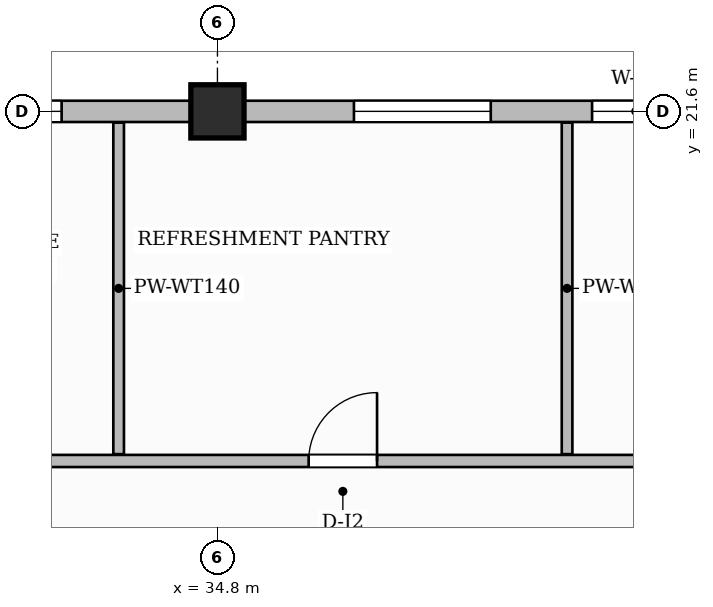
"""IFC4 building model, lengths in metres.
Left out: names, types, materials, properties, quantities, classifications, styles, units other than length and angle.
Written with IfcOpenShell. Run it as: python <this file> out.ifc"""

import sys

from ifc_helpers import new_model, si_unit, direction, frame, frame_2d, origin, origin_2d, place, context, subcontext, project, spatial, rectangle, extrude, source, transform, mapped, element, fill, save


model = new_model("IFC4")
c1 = context("Model", 3, precision=1e-05, world=origin(), true_north=direction((0.0, 1.0)))
c2 = subcontext(c1, "Body", "Model", "MODEL_VIEW")
j1 = project(units=[si_unit("LENGTHUNIT", "METRE"), si_unit("PLANEANGLEUNIT", "RADIAN")], contexts=[c1])
p1 = place(None, origin())
s1 = spatial("IfcSite", under=j1, at=p1, CompositionType="ELEMENT")
p2 = place(p1, origin())
s2 = spatial("IfcBuilding", under=s1, at=p2, CompositionType="ELEMENT")
p3 = place(p2, frame((0.0, 0.0, 290.45)))
s3 = spatial("IfcBuildingStorey", under=s2, at=p3, CompositionType="ELEMENT", Elevation=290.45)
m1 = source(origin(), c2, "Body", "SweptSolid", [
    extrude(rectangle(XDim=0.7, YDim=0.7, at=origin_2d()), origin(), (0.0, 0.0, 1.0), 3.85),
])
p4 = place(p3, frame((34.8, 21.6, 0.0), z_axis=(0.0, 0.0, 1.0), x_axis=(1.0, 0.0, 0.0)))
e1 = element("IfcColumn", 1, at=p4, inside=s3, PredefinedType="COLUMN", context=c2, shape_type="MappedRepresentation", body=[
    mapped(m1, transform((0.0, 0.0, 0.0), scale=1.0)),
])
p5 = place(p3, frame((30.29, 17.0, 0.0), z_axis=(0.0, 0.0, 1.0), x_axis=(1.0, 0.0, 0.0)))
e2 = element("IfcWall", 2, at=p5, inside=s3, PredefinedType="PARTITIONING", context=c2, shape_type="SweptSolid", body=[
    extrude(rectangle(XDim=19.37, YDim=0.16, at=frame_2d((9.685, 0.0))), origin(), (0.0, 0.0, 1.0), 3.55),
])
p6 = place(p5, frame((1.135, 0.0, 0.0)))
e3 = element("IfcOpeningElement", 3, at=p6, cuts=e2, PredefinedType="OPENING", context=c2, shape_type="SweptSolid", body=[
    extrude(rectangle(XDim=0.85, YDim=2.1, at=frame_2d((0.425, 1.05))), frame((0.0, 0.09, 0.0), z_axis=(0.0, -1.0, 0.0), x_axis=(1.0, 0.0, 0.0)), (0.0, 0.0, 1.0), 0.18),
])
p7 = place(p5, frame((5.71, 0.0, 0.0)))
e4 = element("IfcOpeningElement", 4, at=p7, cuts=e2, PredefinedType="OPENING", context=c2, shape_type="SweptSolid", body=[
    extrude(rectangle(XDim=0.9, YDim=2.15, at=frame_2d((0.45, 1.075))), frame((0.0, 0.09, 0.0), z_axis=(0.0, -1.0, 0.0), x_axis=(1.0, 0.0, 0.0)), (0.0, 0.0, 1.0), 0.18),
])
p8 = place(p5, frame((10.635, 0.0, 0.0)))
e5 = element("IfcOpeningElement", 5, at=p8, cuts=e2, PredefinedType="OPENING", context=c2, shape_type="SweptSolid", body=[
    extrude(rectangle(XDim=0.95, YDim=2.15, at=frame_2d((0.475, 1.075))), frame((0.0, 0.09, 0.0), z_axis=(0.0, -1.0, 0.0), x_axis=(1.0, 0.0, 0.0)), (0.0, 0.0, 1.0), 0.18),
])
p9 = place(p5, frame((16.235, 0.0, 0.0)))
e6 = element("IfcOpeningElement", 6, at=p9, cuts=e2, PredefinedType="OPENING", context=c2, shape_type="SweptSolid", body=[
    extrude(rectangle(XDim=0.95, YDim=2.15, at=frame_2d((0.475, 1.075))), frame((0.0, 0.09, 0.0), z_axis=(0.0, -1.0, 0.0), x_axis=(1.0, 0.0, 0.0)), (0.0, 0.0, 1.0), 0.18),
])
for number, where, z_axis, x_axis in (
    (7, (33.5, 17.09, 0.0), (0.0, 0.0, 1.0), (0.0, 1.0, 0.0)),
    (8, (39.4, 17.09, 0.0), (0.0, 0.0, 1.0), (0.0, 1.0, 0.0)),
):
    element("IfcWall", number, at=place(p3, frame(where, z_axis=z_axis, x_axis=x_axis)), inside=s3, PredefinedType="PARTITIONING", context=c2, shape_type="SweptSolid", body=[
        extrude(rectangle(XDim=4.362, YDim=0.14, at=frame_2d((2.181, 0.0))), origin(), (0.0, 0.0, 1.0), 3.55),
    ])
p10 = place(p3, frame((18.0, 21.6, 0.0), z_axis=(0.0, 0.0, 1.0), x_axis=(1.0, 0.0, 0.0)))
e9 = element("IfcWall", 9, at=p10, inside=s3, PredefinedType="SOLIDWALL", context=c2, shape_type="SweptSolid", body=[
    extrude(rectangle(XDim=31.8, YDim=0.28, at=frame_2d((15.9, 0.0))), origin(), (0.0, 0.0, 1.0), 3.135),
])
p11 = place(p10, frame((0.42, 0.0, 0.0)))
e10 = element("IfcOpeningElement", 10, at=p11, cuts=e9, PredefinedType="OPENING", context=c2, shape_type="SweptSolid", body=[
    extrude(rectangle(XDim=1.2, YDim=2.2, at=frame_2d((0.6, 1.1))), frame((0.0, 0.15, 0.0), z_axis=(0.0, -1.0, 0.0), x_axis=(1.0, 0.0, 0.0)), (0.0, 0.0, 1.0), 0.3),
])
p12 = place(p10, frame((4.581, 0.0, 0.8)))
e11 = element("IfcOpeningElement", 11, at=p12, cuts=e9, PredefinedType="OPENING", context=c2, shape_type="SweptSolid", body=[
    extrude(rectangle(XDim=0.95, YDim=1.75, at=frame_2d((0.475, 0.875))), frame((0.0, 0.15, 0.0), z_axis=(0.0, -1.0, 0.0), x_axis=(1.0, 0.0, 0.0)), (0.0, 0.0, 1.0), 0.3),
])
p13 = place(p10, frame((6.964, 0.0, 0.8)))
e12 = element("IfcOpeningElement", 12, at=p13, cuts=e9, PredefinedType="OPENING", context=c2, shape_type="SweptSolid", body=[
    extrude(rectangle(XDim=1.8, YDim=1.85, at=frame_2d((0.9, 0.925))), frame((0.0, 0.15, 0.0), z_axis=(0.0, -1.0, 0.0), x_axis=(1.0, 0.0, 0.0)), (0.0, 0.0, 1.0), 0.3),
])
p14 = place(p10, frame((12.95, 0.0, 0.8)))
e13 = element("IfcOpeningElement", 13, at=p14, cuts=e9, PredefinedType="OPENING", context=c2, shape_type="SweptSolid", body=[
    extrude(rectangle(XDim=1.8, YDim=1.85, at=frame_2d((0.9, 0.925))), frame((0.0, 0.15, 0.0), z_axis=(0.0, -1.0, 0.0), x_axis=(1.0, 0.0, 0.0)), (0.0, 0.0, 1.0), 0.3),
])
p15 = place(p10, frame((18.596, 0.0, 0.8)))
e14 = element("IfcOpeningElement", 14, at=p15, cuts=e9, PredefinedType="OPENING", context=c2, shape_type="SweptSolid", body=[
    extrude(rectangle(XDim=1.8, YDim=1.85, at=frame_2d((0.9, 0.925))), frame((0.0, 0.15, 0.0), z_axis=(0.0, -1.0, 0.0), x_axis=(1.0, 0.0, 0.0)), (0.0, 0.0, 1.0), 0.3),
])
p16 = place(p10, frame((21.729, 0.0, 0.8)))
e15 = element("IfcOpeningElement", 15, at=p16, cuts=e9, PredefinedType="OPENING", context=c2, shape_type="SweptSolid", body=[
    extrude(rectangle(XDim=1.15, YDim=1.8, at=frame_2d((0.575, 0.9))), frame((0.0, 0.15, 0.0), z_axis=(0.0, -1.0, 0.0), x_axis=(1.0, 0.0, 0.0)), (0.0, 0.0, 1.0), 0.3),
])
p17 = place(p10, frame((25.121, 0.0, 0.8)))
e16 = element("IfcOpeningElement", 16, at=p17, cuts=e9, PredefinedType="OPENING", context=c2, shape_type="SweptSolid", body=[
    extrude(rectangle(XDim=0.95, YDim=1.75, at=frame_2d((0.475, 0.875))), frame((0.0, 0.15, 0.0), z_axis=(0.0, -1.0, 0.0), x_axis=(1.0, 0.0, 0.0)), (0.0, 0.0, 1.0), 0.3),
])
p18 = place(p10, frame((27.804, 0.0, 0.8)))
e17 = element("IfcOpeningElement", 17, at=p18, cuts=e9, PredefinedType="OPENING", context=c2, shape_type="SweptSolid", body=[
    extrude(rectangle(XDim=1.8, YDim=1.85, at=frame_2d((0.9, 0.925))), frame((0.0, 0.15, 0.0), z_axis=(0.0, -1.0, 0.0), x_axis=(1.0, 0.0, 0.0)), (0.0, 0.0, 1.0), 0.3),
])
m2 = source(origin(), c2, "Body", "SweptSolid", [
    extrude(rectangle(XDim=0.9, YDim=2.15, at=frame_2d((0.45, 1.075))), frame((0.0, 0.025, 0.0), z_axis=(0.0, -1.0, 0.0), x_axis=(1.0, 0.0, 0.0)), (0.0, 0.0, 1.0), 0.05),
])
p19 = place(p7, origin())
e18 = element("IfcDoor", 18, at=p19, inside=s3, OperationType="SINGLE_SWING_RIGHT", PredefinedType="DOOR", context=c2, shape_type="MappedRepresentation", body=[
    mapped(m2, transform((0.0, 0.0, 0.0), scale=1.0)),
])
fill(e4, e18)
m3 = source(origin(), c2, "Body", "SweptSolid", [
    extrude(rectangle(XDim=1.8, YDim=1.85, at=frame_2d((0.9, 0.925))), frame((0.0, 0.03, 0.0), z_axis=(0.0, -1.0, 0.0), x_axis=(1.0, 0.0, 0.0)), (0.0, 0.0, 1.0), 0.06),
])
p20 = place(p14, origin())
e19 = element("IfcWindow", 19, at=p20, inside=s3, PartitioningType="DOUBLE_PANEL_VERTICAL", PredefinedType="WINDOW", context=c2, shape_type="MappedRepresentation", body=[
    mapped(m3, transform((0.0, 0.0, 0.0), scale=1.0)),
])
fill(e13, e19)
p21 = place(p15, origin())
e20 = element("IfcWindow", 20, at=p21, inside=s3, PartitioningType="DOUBLE_PANEL_VERTICAL", PredefinedType="WINDOW", context=c2, shape_type="MappedRepresentation", body=[
    mapped(m3, transform((0.0, 0.0, 0.0), scale=1.0)),
])
fill(e14, e20)
m4 = source(origin(), c2, "Body", "SweptSolid", [
    extrude(rectangle(XDim=1.15, YDim=1.8, at=frame_2d((0.575, 0.9))), frame((0.0, 0.03, 0.0), z_axis=(0.0, -1.0, 0.0), x_axis=(1.0, 0.0, 0.0)), (0.0, 0.0, 1.0), 0.06),
])
p22 = place(p16, origin())
e21 = element("IfcWindow", 21, at=p22, inside=s3, PartitioningType="SINGLE_PANEL", PredefinedType="WINDOW", context=c2, shape_type="MappedRepresentation", body=[
    mapped(m4, transform((0.0, 0.0, 0.0), scale=1.0)),
])
fill(e15, e21)
save(model, sys.argv[1])
